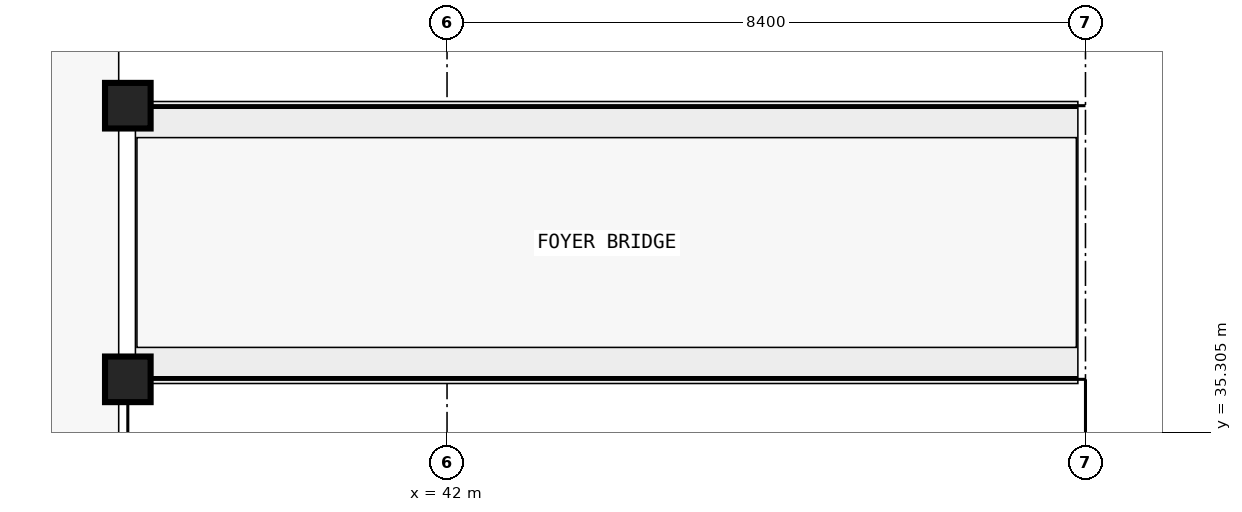
"""IFC4 building model, lengths in metres.
Left out: names, types, materials, properties, quantities, classifications, styles, units other than length and angle.
Written with IfcOpenShell. Run it as: python <this file> out.ifc"""

import sys

from ifc_helpers import new_model, si_unit, direction, frame, origin, origin_2d, place, context, subcontext, project, spatial, rectangle, extrude, element, save


model = new_model("IFC4")
c1 = context("Model", 3, precision=1e-05, world=origin(), true_north=direction((0.0, 1.0)))
c2 = subcontext(c1, "Body", "Model", "MODEL_VIEW")
j1 = project(units=[si_unit("LENGTHUNIT", "METRE"), si_unit("PLANEANGLEUNIT", "RADIAN")], contexts=[c1])
p1 = place(None, origin())
s1 = spatial("IfcSite", under=j1, at=p1, CompositionType="ELEMENT")
p2 = place(p1, origin())
s2 = spatial("IfcBuilding", under=s1, at=p2, CompositionType="ELEMENT")
p3 = place(p2, frame((0.0, 0.0, 10.2)))
s3 = spatial("IfcBuildingStorey", under=s2, at=p3, CompositionType="ELEMENT", Elevation=10.2)
for number, where, z_axis, x_axis in (
    (1, (37.8, 36.0, 0.0), (0.0, 0.0, 1.0), (1.0, 0.0, 0.0)),
    (2, (37.8, 39.6, 0.0), (0.0, 0.0, 1.0), (1.0, 0.0, 0.0)),
):
    element("IfcColumn", number, at=place(p3, frame(where, z_axis=z_axis, x_axis=x_axis)), inside=s3, PredefinedType="COLUMN", context=c2, shape_type="SweptSolid", body=[
        extrude(rectangle(XDim=0.6, YDim=0.6, at=origin_2d()), origin(), (0.0, 0.0, 1.0), 4.8),
    ])
save(model, sys.argv[1])
